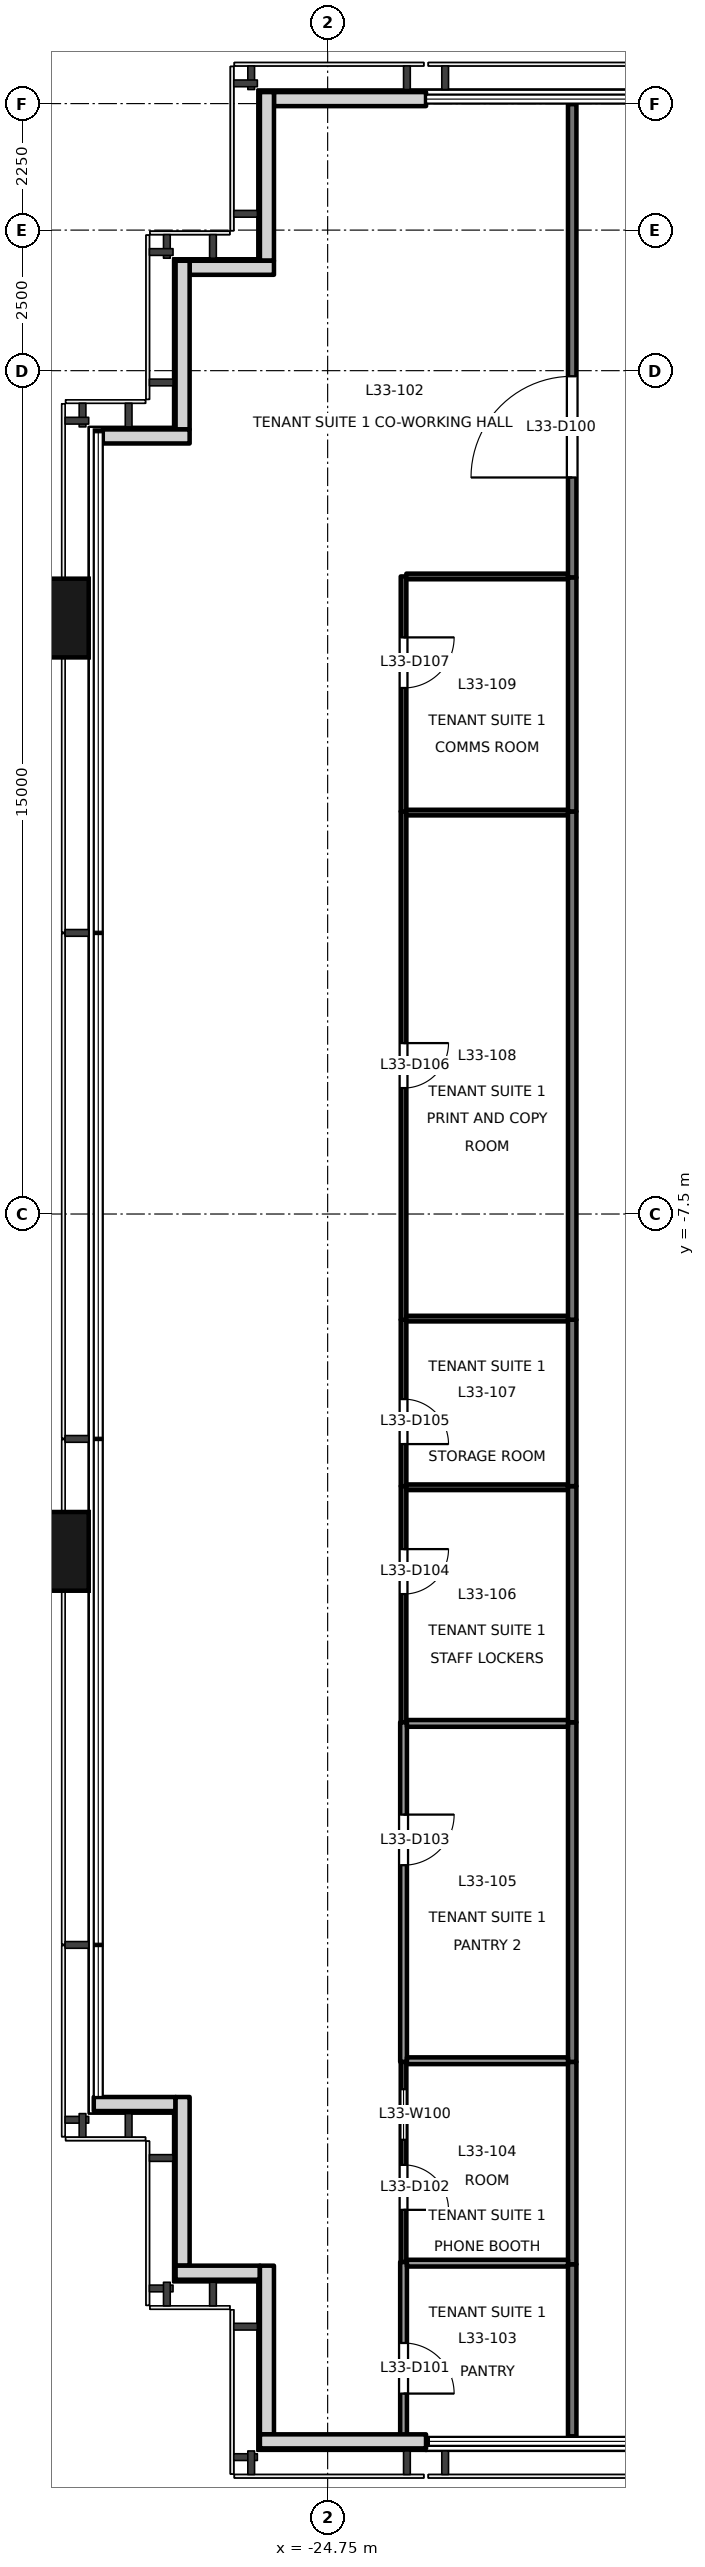
"""IFC4 building model, lengths in metres.
Left out: names, types, materials, properties, quantities, classifications, styles, units other than length and angle.
Written with IfcOpenShell. Run it as: python <this file> out.ifc"""

import sys

from ifc_helpers import new_model, si_unit, direction, frame, frame_2d, origin, origin_2d, place, context, subcontext, project, spatial, rectangle, extrude, element, fill, save


model = new_model("IFC4")
c1 = context("Model", 3, precision=1e-05, world=origin(), true_north=direction((0.0, 1.0)))
c2 = subcontext(c1, "Body", "Model", "MODEL_VIEW")
j1 = project(units=[si_unit("LENGTHUNIT", "METRE"), si_unit("PLANEANGLEUNIT", "RADIAN")], contexts=[c1])
p1 = place(None, origin())
s1 = spatial("IfcSite", under=j1, at=p1, CompositionType="ELEMENT")
p2 = place(p1, origin())
s2 = spatial("IfcBuilding", under=s1, at=p2, CompositionType="ELEMENT")
p3 = place(p2, frame((0.0, 0.0, 146.1)))
s3 = spatial("IfcBuildingStorey", under=s2, at=p3, CompositionType="ELEMENT", Elevation=146.1)
for number, where, z_axis, x_axis in (
    (1, (-29.9, -13.5, -0.2), (0.0, 0.0, 1.0), (0.0, 1.0, 0.0)),
    (2, (-29.9, 3.1, -0.2), (0.0, 0.0, 1.0), (0.0, 1.0, 0.0)),
):
    element("IfcColumn", number, at=place(p3, frame(where, z_axis=z_axis, x_axis=x_axis)), inside=s3, PredefinedType="COLUMN", context=c2, shape_type="SweptSolid", body=[
        extrude(rectangle(XDim=1.4, YDim=1.8, at=origin_2d()), origin(), (0.0, 0.0, 1.0), 4.0),
    ])
p4 = place(p3, frame((-23.0, 12.33, 0.0), z_axis=(0.0, 0.0, 1.0), x_axis=(-1.0, 0.0, 0.0)))
e3 = element("IfcWall", 3, at=p4, inside=s3, PredefinedType="SOLIDWALL", context=c2, shape_type="SweptSolid", body=[
    extrude(rectangle(XDim=2.705, YDim=0.25, at=frame_2d((1.353, 0.0))), origin(), (0.0, 0.0, 1.0), 3.8),
])
p5 = place(p3, frame((-25.83, 12.455, 0.0), z_axis=(0.0, 0.0, 1.0), x_axis=(0.0, -1.0, 0.0)))
e4 = element("IfcWall", 4, at=p5, inside=s3, PredefinedType="SOLIDWALL", context=c2, shape_type="SweptSolid", body=[
    extrude(rectangle(XDim=3.0, YDim=0.25, at=frame_2d((1.5, 0.0))), origin(), (0.0, 0.0, 1.0), 3.8),
])
p6 = place(p3, frame((-25.705, 9.33, 0.0), z_axis=(0.0, 0.0, 1.0), x_axis=(-1.0, 0.0, 0.0)))
e5 = element("IfcWall", 5, at=p6, inside=s3, PredefinedType="SOLIDWALL", context=c2, shape_type="SweptSolid", body=[
    extrude(rectangle(XDim=1.5, YDim=0.25, at=frame_2d((0.75, 0.0))), origin(), (0.0, 0.0, 1.0), 3.8),
])
p7 = place(p3, frame((-27.33, 9.455, 0.0), z_axis=(0.0, 0.0, 1.0), x_axis=(0.0, -1.0, 0.0)))
e6 = element("IfcWall", 6, at=p7, inside=s3, PredefinedType="SOLIDWALL", context=c2, shape_type="SweptSolid", body=[
    extrude(rectangle(XDim=3.0, YDim=0.25, at=frame_2d((1.5, 0.0))), origin(), (0.0, 0.0, 1.0), 3.8),
])
p8 = place(p3, frame((-27.205, 6.33, 0.0), z_axis=(0.0, 0.0, 1.0), x_axis=(-1.0, 0.0, 0.0)))
e7 = element("IfcWall", 7, at=p8, inside=s3, PredefinedType="SOLIDWALL", context=c2, shape_type="SweptSolid", body=[
    extrude(rectangle(XDim=1.545, YDim=0.25, at=frame_2d((0.772, 0.0))), origin(), (0.0, 0.0, 1.0), 3.8),
])
p9 = place(p3, frame((-28.91, -23.33, 0.0), z_axis=(0.0, 0.0, 1.0), x_axis=(1.0, 0.0, 0.0)))
e8 = element("IfcWall", 8, at=p9, inside=s3, PredefinedType="SOLIDWALL", context=c2, shape_type="SweptSolid", body=[
    extrude(rectangle(XDim=1.455, YDim=0.25, at=frame_2d((0.728, 0.0))), origin(), (0.0, 0.0, 1.0), 3.8),
])
p10 = place(p3, frame((-27.33, -23.205, 0.0), z_axis=(0.0, 0.0, 1.0), x_axis=(0.0, -1.0, 0.0)))
e9 = element("IfcWall", 9, at=p10, inside=s3, PredefinedType="SOLIDWALL", context=c2, shape_type="SweptSolid", body=[
    extrude(rectangle(XDim=3.0, YDim=0.25, at=frame_2d((1.5, 0.0))), origin(), (0.0, 0.0, 1.0), 3.8),
])
p11 = place(p3, frame((-27.455, -26.33, 0.0), z_axis=(0.0, 0.0, 1.0), x_axis=(1.0, 0.0, 0.0)))
e10 = element("IfcWall", 10, at=p11, inside=s3, PredefinedType="SOLIDWALL", context=c2, shape_type="SweptSolid", body=[
    extrude(rectangle(XDim=1.5, YDim=0.25, at=frame_2d((0.75, 0.0))), origin(), (0.0, 0.0, 1.0), 3.8),
])
p12 = place(p3, frame((-25.83, -26.205, 0.0), z_axis=(0.0, 0.0, 1.0), x_axis=(0.0, -1.0, 0.0)))
e11 = element("IfcWall", 11, at=p12, inside=s3, PredefinedType="SOLIDWALL", context=c2, shape_type="SweptSolid", body=[
    extrude(rectangle(XDim=3.0, YDim=0.25, at=frame_2d((1.5, 0.0))), origin(), (0.0, 0.0, 1.0), 3.8),
])
p13 = place(p3, frame((-25.955, -29.33, 0.0), z_axis=(0.0, 0.0, 1.0), x_axis=(1.0, 0.0, 0.0)))
e12 = element("IfcWall", 12, at=p13, inside=s3, PredefinedType="SOLIDWALL", context=c2, shape_type="SweptSolid", body=[
    extrude(rectangle(XDim=2.955, YDim=0.25, at=frame_2d((1.478, 0.0))), origin(), (0.0, 0.0, 1.0), 3.8),
])
p14 = place(p3, frame((-20.4, 3.82, 0.0), z_axis=(0.0, 0.0, 1.0), x_axis=(0.0, 1.0, 0.0)))
e13 = element("IfcWall", 13, at=p14, inside=s3, PredefinedType="PARTITIONING", context=c2, shape_type="SweptSolid", body=[
    extrude(rectangle(XDim=8.42, YDim=0.15, at=frame_2d((4.21, 0.0))), origin(), (0.0, 0.0, 1.0), 3.3),
])
p15 = place(p14, frame((1.78, 0.0, 0.0)))
e14 = element("IfcOpeningElement", 14, at=p15, cuts=e13, PredefinedType="OPENING", context=c2, shape_type="SweptSolid", body=[
    extrude(rectangle(XDim=1.8, YDim=2.1, at=frame_2d((0.9, 1.05))), frame((0.0, 0.085, 0.0), z_axis=(0.0, -1.0, 0.0), x_axis=(1.0, 0.0, 0.0)), (0.0, 0.0, 1.0), 0.171),
])
p16 = place(p3, frame((-20.4, -29.24, 0.0), z_axis=(0.0, 0.0, 1.0), x_axis=(0.0, 1.0, 0.0)))
e15 = element("IfcWall", 15, at=p16, inside=s3, PredefinedType="PARTITIONING", context=c2, shape_type="SweptSolid", body=[
    extrude(rectangle(XDim=3.06, YDim=0.15, at=frame_2d((1.53, 0.0))), origin(), (0.0, 0.0, 1.0), 3.8),
])
p17 = place(p3, frame((-20.4, -26.18, 0.0), z_axis=(0.0, 0.0, 1.0), x_axis=(0.0, 1.0, 0.0)))
e16 = element("IfcWall", 16, at=p17, inside=s3, PredefinedType="PARTITIONING", context=c2, shape_type="SweptSolid", body=[
    extrude(rectangle(XDim=3.6, YDim=0.15, at=frame_2d((1.8, 0.0))), origin(), (0.0, 0.0, 1.0), 3.8),
])
p18 = place(p3, frame((-20.4, -22.58, 0.0), z_axis=(0.0, 0.0, 1.0), x_axis=(0.0, 1.0, 0.0)))
e17 = element("IfcWall", 17, at=p18, inside=s3, PredefinedType="PARTITIONING", context=c2, shape_type="SweptSolid", body=[
    extrude(rectangle(XDim=6.04, YDim=0.15, at=frame_2d((3.02, 0.0))), origin(), (0.0, 0.0, 1.0), 3.8),
])
p19 = place(p3, frame((-20.4, -16.54, 0.0), z_axis=(0.0, 0.0, 1.0), x_axis=(0.0, 1.0, 0.0)))
e18 = element("IfcWall", 18, at=p19, inside=s3, PredefinedType="PARTITIONING", context=c2, shape_type="SweptSolid", body=[
    extrude(rectangle(XDim=4.2, YDim=0.15, at=frame_2d((2.1, 0.0))), origin(), (0.0, 0.0, 1.0), 3.8),
])
p20 = place(p3, frame((-20.4, -12.34, 0.0), z_axis=(0.0, 0.0, 1.0), x_axis=(0.0, 1.0, 0.0)))
e19 = element("IfcWall", 19, at=p20, inside=s3, PredefinedType="PARTITIONING", context=c2, shape_type="SweptSolid", body=[
    extrude(rectangle(XDim=2.96, YDim=0.15, at=frame_2d((1.48, 0.0))), origin(), (0.0, 0.0, 1.0), 3.8),
])
p21 = place(p3, frame((-20.4, -9.38, 0.0), z_axis=(0.0, 0.0, 1.0), x_axis=(0.0, 1.0, 0.0)))
e20 = element("IfcWall", 20, at=p21, inside=s3, PredefinedType="PARTITIONING", context=c2, shape_type="SweptSolid", body=[
    extrude(rectangle(XDim=9.04, YDim=0.15, at=frame_2d((4.52, 0.0))), origin(), (0.0, 0.0, 1.0), 3.3),
])
p22 = place(p3, frame((-20.4, -0.34, 0.0), z_axis=(0.0, 0.0, 1.0), x_axis=(0.0, 1.0, 0.0)))
e21 = element("IfcWall", 21, at=p22, inside=s3, PredefinedType="PARTITIONING", context=c2, shape_type="SweptSolid", body=[
    extrude(rectangle(XDim=4.16, YDim=0.15, at=frame_2d((2.08, 0.0))), origin(), (0.0, 0.0, 1.0), 3.3),
])
p23 = place(p3, frame((-23.4, -26.14, 0.0), z_axis=(0.0, 0.0, 1.0), x_axis=(0.0, -1.0, 0.0)))
e22 = element("IfcWall", 22, at=p23, inside=s3, PredefinedType="PARTITIONING", context=c2, shape_type="SweptSolid", body=[
    extrude(rectangle(XDim=3.1, YDim=0.12, at=frame_2d((1.55, 0.0))), origin(), (0.0, 0.0, 1.0), 3.8),
])
p24 = place(p23, frame((1.44, 0.0, 0.0)))
e23 = element("IfcOpeningElement", 23, at=p24, cuts=e22, PredefinedType="OPENING", context=c2, shape_type="SweptSolid", body=[
    extrude(rectangle(XDim=0.9, YDim=2.1, at=frame_2d((0.45, 1.05))), frame((0.0, 0.071, 0.0), z_axis=(0.0, -1.0, 0.0), x_axis=(1.0, 0.0, 0.0)), (0.0, 0.0, 1.0), 0.141),
])
p25 = place(p3, frame((-23.4, -22.58, 0.0), z_axis=(0.0, 0.0, 1.0), x_axis=(0.0, -1.0, 0.0)))
e24 = element("IfcWall", 24, at=p25, inside=s3, PredefinedType="PARTITIONING", context=c2, shape_type="SweptSolid", body=[
    extrude(rectangle(XDim=3.56, YDim=0.1, at=frame_2d((1.78, 0.0))), origin(), (0.0, 0.0, 1.0), 3.8),
])
p26 = place(p25, frame((1.832, 0.0, 0.0)))
e25 = element("IfcOpeningElement", 25, at=p26, cuts=e24, PredefinedType="OPENING", context=c2, shape_type="SweptSolid", body=[
    extrude(rectangle(XDim=0.8, YDim=2.1, at=frame_2d((0.4, 1.05))), frame((0.0, 0.061, 0.0), z_axis=(0.0, -1.0, 0.0), x_axis=(1.0, 0.0, 0.0)), (0.0, 0.0, 1.0), 0.121),
])
p27 = place(p25, frame((0.486, 0.0, 0.9)))
e26 = element("IfcOpeningElement", 26, at=p27, cuts=e24, PredefinedType="OPENING", context=c2, shape_type="SweptSolid", body=[
    extrude(rectangle(XDim=0.9, YDim=1.2, at=frame_2d((0.45, 0.6))), frame((0.0, 0.061, 0.0), z_axis=(0.0, -1.0, 0.0), x_axis=(1.0, 0.0, 0.0)), (0.0, 0.0, 1.0), 0.121),
])
p28 = place(p3, frame((-23.4, -16.54, 0.0), z_axis=(0.0, 0.0, 1.0), x_axis=(0.0, -1.0, 0.0)))
e27 = element("IfcWall", 27, at=p28, inside=s3, PredefinedType="PARTITIONING", context=c2, shape_type="SweptSolid", body=[
    extrude(rectangle(XDim=6.04, YDim=0.12, at=frame_2d((3.02, 0.0))), origin(), (0.0, 0.0, 1.0), 3.8),
])
p29 = place(p28, frame((1.642, 0.0, 0.0)))
e28 = element("IfcOpeningElement", 28, at=p29, cuts=e27, PredefinedType="OPENING", context=c2, shape_type="SweptSolid", body=[
    extrude(rectangle(XDim=0.9, YDim=2.1, at=frame_2d((0.45, 1.05))), frame((0.0, 0.071, 0.0), z_axis=(0.0, -1.0, 0.0), x_axis=(1.0, 0.0, 0.0)), (0.0, 0.0, 1.0), 0.141),
])
p30 = place(p3, frame((-23.4, -12.34, 0.0), z_axis=(0.0, 0.0, 1.0), x_axis=(0.0, -1.0, 0.0)))
e29 = element("IfcWall", 29, at=p30, inside=s3, PredefinedType="PARTITIONING", context=c2, shape_type="SweptSolid", body=[
    extrude(rectangle(XDim=4.2, YDim=0.1, at=frame_2d((2.1, 0.0))), origin(), (0.0, 0.0, 1.0), 3.8),
])
p31 = place(p30, frame((1.12, 0.0, 0.0)))
e30 = element("IfcOpeningElement", 30, at=p31, cuts=e29, PredefinedType="OPENING", context=c2, shape_type="SweptSolid", body=[
    extrude(rectangle(XDim=0.8, YDim=2.1, at=frame_2d((0.4, 1.05))), frame((0.0, 0.061, 0.0), z_axis=(0.0, -1.0, 0.0), x_axis=(1.0, 0.0, 0.0)), (0.0, 0.0, 1.0), 0.121),
])
p32 = place(p3, frame((-23.4, -9.38, 0.0), z_axis=(0.0, 0.0, 1.0), x_axis=(0.0, -1.0, 0.0)))
e31 = element("IfcWall", 31, at=p32, inside=s3, PredefinedType="PARTITIONING", context=c2, shape_type="SweptSolid", body=[
    extrude(rectangle(XDim=2.96, YDim=0.1, at=frame_2d((1.48, 0.0))), origin(), (0.0, 0.0, 1.0), 3.8),
])
p33 = place(p32, frame((1.412, 0.0, 0.0)))
e32 = element("IfcOpeningElement", 32, at=p33, cuts=e31, PredefinedType="OPENING", context=c2, shape_type="SweptSolid", body=[
    extrude(rectangle(XDim=0.8, YDim=2.1, at=frame_2d((0.4, 1.05))), frame((0.0, 0.061, 0.0), z_axis=(0.0, -1.0, 0.0), x_axis=(1.0, 0.0, 0.0)), (0.0, 0.0, 1.0), 0.121),
])
p34 = place(p3, frame((-23.4, -0.34, 0.0), z_axis=(0.0, 0.0, 1.0), x_axis=(0.0, -1.0, 0.0)))
e33 = element("IfcWall", 33, at=p34, inside=s3, PredefinedType="PARTITIONING", context=c2, shape_type="SweptSolid", body=[
    extrude(rectangle(XDim=9.04, YDim=0.1, at=frame_2d((4.52, 0.0))), origin(), (0.0, 0.0, 1.0), 3.3),
])
p35 = place(p34, frame((4.12, 0.0, 0.0)))
e34 = element("IfcOpeningElement", 34, at=p35, cuts=e33, PredefinedType="OPENING", context=c2, shape_type="SweptSolid", body=[
    extrude(rectangle(XDim=0.8, YDim=2.1, at=frame_2d((0.4, 1.05))), frame((0.0, 0.061, 0.0), z_axis=(0.0, -1.0, 0.0), x_axis=(1.0, 0.0, 0.0)), (0.0, 0.0, 1.0), 0.121),
])
p36 = place(p3, frame((-23.4, 3.84, 0.0), z_axis=(0.0, 0.0, 1.0), x_axis=(0.0, -1.0, 0.0)))
e35 = element("IfcWall", 35, at=p36, inside=s3, PredefinedType="PARTITIONING", context=c2, shape_type="SweptSolid", body=[
    extrude(rectangle(XDim=4.18, YDim=0.1, at=frame_2d((2.09, 0.0))), origin(), (0.0, 0.0, 1.0), 3.3),
])
p37 = place(p36, frame((1.084, 0.0, 0.0)))
e36 = element("IfcOpeningElement", 36, at=p37, cuts=e35, PredefinedType="OPENING", context=c2, shape_type="SweptSolid", body=[
    extrude(rectangle(XDim=0.9, YDim=2.1, at=frame_2d((0.45, 1.05))), frame((0.0, 0.061, 0.0), z_axis=(0.0, -1.0, 0.0), x_axis=(1.0, 0.0, 0.0)), (0.0, 0.0, 1.0), 0.121),
])
p38 = place(p3, frame((-20.475, 3.84, 0.0), z_axis=(0.0, 0.0, 1.0), x_axis=(-1.0, 0.0, 0.0)))
e37 = element("IfcWall", 37, at=p38, inside=s3, PredefinedType="PARTITIONING", context=c2, shape_type="SweptSolid", body=[
    extrude(rectangle(XDim=2.875, YDim=0.1, at=frame_2d((1.438, 0.0))), origin(), (0.0, 0.0, 1.0), 3.8),
])
for number, where, z_axis, x_axis in (
    (38, (-23.34, -26.16, 0.0), (0.0, 0.0, 1.0), (1.0, 0.0, 0.0)),
    (39, (-23.34, -22.56, 0.0), (0.0, 0.0, 1.0), (1.0, 0.0, 0.0)),
    (40, (-23.34, -16.56, 0.0), (0.0, 0.0, 1.0), (1.0, 0.0, 0.0)),
):
    element("IfcWall", number, at=place(p3, frame(where, z_axis=z_axis, x_axis=x_axis)), inside=s3, PredefinedType="PARTITIONING", context=c2, shape_type="SweptSolid", body=[
        extrude(rectangle(XDim=2.865, YDim=0.12, at=frame_2d((1.433, 0.0))), origin(), (0.0, 0.0, 1.0), 3.8),
    ])
for number, where, z_axis, x_axis in (
    (41, (-23.35, -12.36, 0.0), (0.0, 0.0, 1.0), (1.0, 0.0, 0.0)),
    (42, (-23.35, -9.36, 0.0), (0.0, 0.0, 1.0), (1.0, 0.0, 0.0)),
    (43, (-23.35, -0.36, 0.0), (0.0, 0.0, 1.0), (1.0, 0.0, 0.0)),
):
    element("IfcWall", number, at=place(p3, frame(where, z_axis=z_axis, x_axis=x_axis)), inside=s3, PredefinedType="PARTITIONING", context=c2, shape_type="SweptSolid", body=[
        extrude(rectangle(XDim=2.875, YDim=0.1, at=frame_2d((1.438, 0.0))), origin(), (0.0, 0.0, 1.0), 3.8),
    ])
p39 = place(p15, origin())
e44 = element("IfcDoor", 44, at=p39, inside=s3, OperationType="DOUBLE_DOOR_SINGLE_SWING", PredefinedType="DOOR", context=c2, shape_type="SweptSolid", body=[
    extrude(rectangle(XDim=1.8, YDim=2.1, at=frame_2d((0.9, 1.05))), frame((0.0, 0.025, 0.0), z_axis=(0.0, -1.0, 0.0), x_axis=(1.0, 0.0, 0.0)), (0.0, 0.0, 1.0), 0.05),
])
fill(e14, e44)
p40 = place(p24, origin())
e45 = element("IfcDoor", 45, at=p40, inside=s3, OperationType="SINGLE_SWING_RIGHT", PredefinedType="DOOR", context=c2, shape_type="SweptSolid", body=[
    extrude(rectangle(XDim=0.9, YDim=2.1, at=frame_2d((0.45, 1.05))), frame((0.0, 0.025, 0.0), z_axis=(0.0, -1.0, 0.0), x_axis=(1.0, 0.0, 0.0)), (0.0, 0.0, 1.0), 0.05),
])
fill(e23, e45)
p41 = place(p26, origin())
e46 = element("IfcDoor", 46, at=p41, inside=s3, OperationType="SINGLE_SWING_RIGHT", PredefinedType="DOOR", context=c2, shape_type="SweptSolid", body=[
    extrude(rectangle(XDim=0.8, YDim=2.1, at=frame_2d((0.4, 1.05))), frame((0.0, 0.025, 0.0), z_axis=(0.0, -1.0, 0.0), x_axis=(1.0, 0.0, 0.0)), (0.0, 0.0, 1.0), 0.05),
])
fill(e25, e46)
p42 = place(p29, origin())
e47 = element("IfcDoor", 47, at=p42, inside=s3, OperationType="SINGLE_SWING_LEFT", PredefinedType="DOOR", context=c2, shape_type="SweptSolid", body=[
    extrude(rectangle(XDim=0.9, YDim=2.1, at=frame_2d((0.45, 1.05))), frame((0.0, 0.025, 0.0), z_axis=(0.0, -1.0, 0.0), x_axis=(1.0, 0.0, 0.0)), (0.0, 0.0, 1.0), 0.05),
])
fill(e28, e47)
p43 = place(p31, origin())
e48 = element("IfcDoor", 48, at=p43, inside=s3, OperationType="SINGLE_SWING_LEFT", PredefinedType="DOOR", context=c2, shape_type="SweptSolid", body=[
    extrude(rectangle(XDim=0.8, YDim=2.1, at=frame_2d((0.4, 1.05))), frame((0.0, 0.025, 0.0), z_axis=(0.0, -1.0, 0.0), x_axis=(1.0, 0.0, 0.0)), (0.0, 0.0, 1.0), 0.05),
])
fill(e30, e48)
p44 = place(p33, origin())
e49 = element("IfcDoor", 49, at=p44, inside=s3, OperationType="SINGLE_SWING_RIGHT", PredefinedType="DOOR", context=c2, shape_type="SweptSolid", body=[
    extrude(rectangle(XDim=0.8, YDim=2.1, at=frame_2d((0.4, 1.05))), frame((0.0, 0.025, 0.0), z_axis=(0.0, -1.0, 0.0), x_axis=(1.0, 0.0, 0.0)), (0.0, 0.0, 1.0), 0.05),
])
fill(e32, e49)
p45 = place(p35, origin())
e50 = element("IfcDoor", 50, at=p45, inside=s3, OperationType="SINGLE_SWING_LEFT", PredefinedType="DOOR", context=c2, shape_type="SweptSolid", body=[
    extrude(rectangle(XDim=0.8, YDim=2.1, at=frame_2d((0.4, 1.05))), frame((0.0, 0.025, 0.0), z_axis=(0.0, -1.0, 0.0), x_axis=(1.0, 0.0, 0.0)), (0.0, 0.0, 1.0), 0.05),
])
fill(e34, e50)
p46 = place(p37, origin())
e51 = element("IfcDoor", 51, at=p46, inside=s3, OperationType="SINGLE_SWING_LEFT", PredefinedType="DOOR", context=c2, shape_type="SweptSolid", body=[
    extrude(rectangle(XDim=0.9, YDim=2.1, at=frame_2d((0.45, 1.05))), frame((0.0, 0.025, 0.0), z_axis=(0.0, -1.0, 0.0), x_axis=(1.0, 0.0, 0.0)), (0.0, 0.0, 1.0), 0.05),
])
fill(e36, e51)
p47 = place(p27, origin())
e52 = element("IfcWindow", 52, at=p47, inside=s3, PartitioningType="SINGLE_PANEL", PredefinedType="WINDOW", context=c2, shape_type="SweptSolid", body=[
    extrude(rectangle(XDim=0.9, YDim=1.2, at=frame_2d((0.45, 0.6))), frame((0.0, 0.03, 0.0), z_axis=(0.0, -1.0, 0.0), x_axis=(1.0, 0.0, 0.0)), (0.0, 0.0, 1.0), 0.06),
])
fill(e26, e52)
save(model, sys.argv[1])
